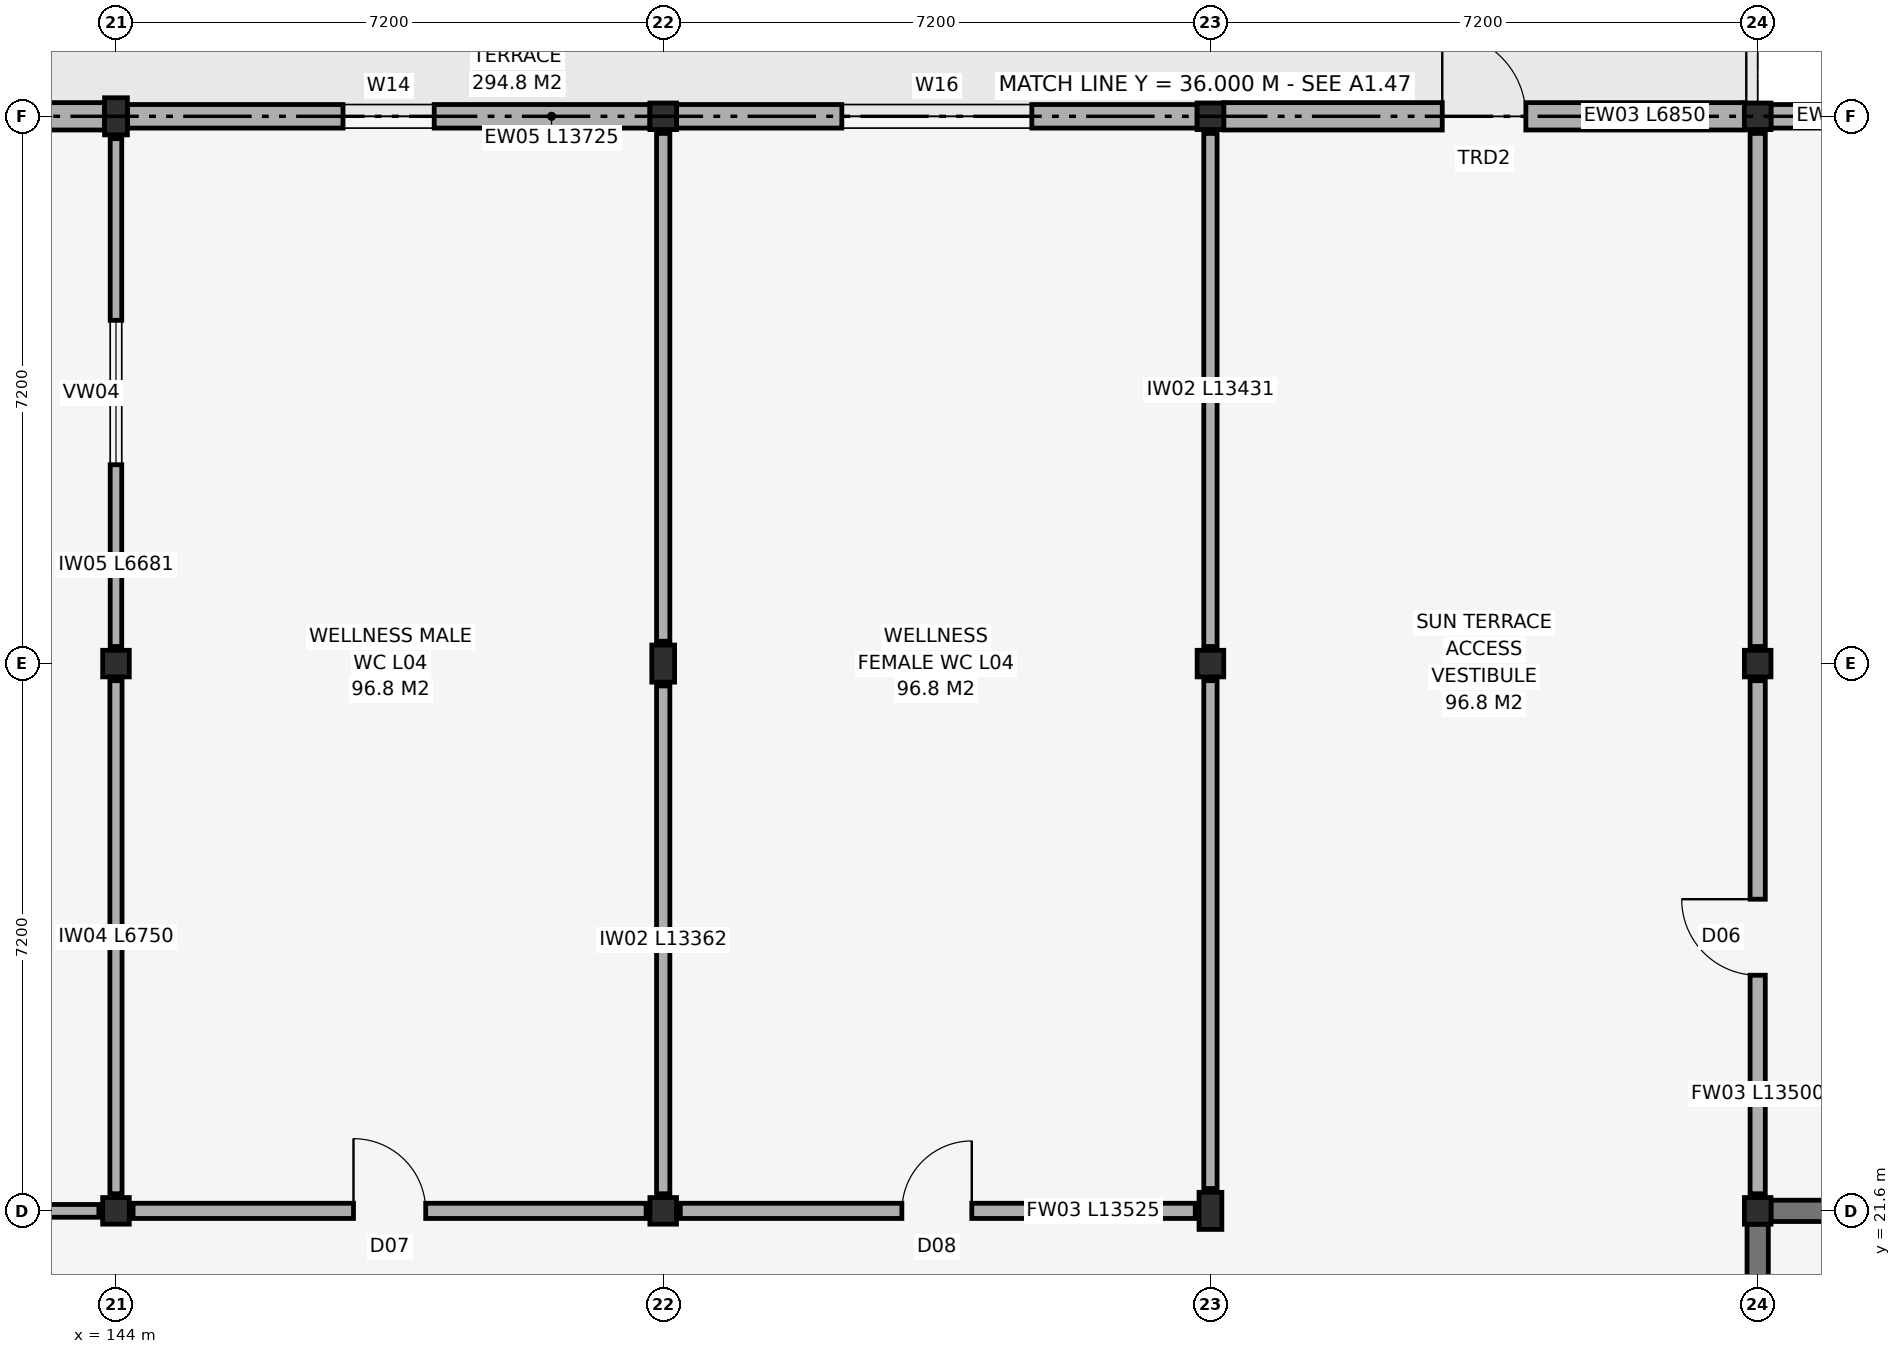
"""IFC4 building model, lengths in metres.
Left out: names, types, materials, properties, quantities, classifications, styles, units other than length and angle.
Written with IfcOpenShell. Run it as: python <this file> out.ifc"""

import sys

from ifc_helpers import new_model, si_unit, direction, frame, frame_2d, origin, origin_2d, place, context, subcontext, project, spatial, rectangle, i_section, extrude, element, fill, save


model = new_model("IFC4")
c1 = context("Model", 3, precision=1e-05, world=origin(), true_north=direction((0.0, 1.0)))
c2 = subcontext(c1, "Body", "Model", "MODEL_VIEW")
j1 = project(units=[si_unit("LENGTHUNIT", "METRE"), si_unit("PLANEANGLEUNIT", "RADIAN")], contexts=[c1])
p1 = place(None, origin())
s1 = spatial("IfcSite", under=j1, at=p1, CompositionType="ELEMENT")
p2 = place(p1, origin())
s2 = spatial("IfcBuilding", under=s1, at=p2, CompositionType="ELEMENT")
p3 = place(p2, frame((0.0, 0.0, 19.2)))
s3 = spatial("IfcBuildingStorey", under=s2, at=p3, CompositionType="ELEMENT", Elevation=19.2)
for number, where, z_axis, x_axis in (
    (1, (144.0, 21.6, 0.0), (0.0, 0.0, 1.0), (1.0, 0.0, 0.0)),
    (2, (144.0, 28.8, 0.0), (0.0, 0.0, 1.0), (1.0, 0.0, 0.0)),
):
    element("IfcColumn", number, at=place(p3, frame(where, z_axis=z_axis, x_axis=x_axis)), inside=s3, PredefinedType="COLUMN", context=c2, shape_type="SweptSolid", body=[
        extrude(i_section(OverallWidth=0.35, OverallDepth=0.35, WebThickness=0.012, FlangeThickness=0.019, FilletRadius=0.02, at=origin_2d()), origin(), (0.0, 0.0, 1.0), 4.2),
    ])
p4 = place(p3, frame((144.0, 36.0, 0.0), z_axis=(0.0, 0.0, 1.0), x_axis=(1.0, 0.0, 0.0)))
e3 = element("IfcColumn", 3, at=p4, inside=s3, PredefinedType="COLUMN", context=c2, shape_type="SweptSolid", body=[
    extrude(i_section(OverallWidth=0.3, OverallDepth=0.488, WebThickness=0.011, FlangeThickness=0.018, FilletRadius=0.026, at=origin_2d()), origin(), (0.0, 0.0, 1.0), 4.2),
])
p5 = place(p3, frame((151.2, 21.6, 0.0), z_axis=(0.0, 0.0, 1.0), x_axis=(1.0, 0.0, 0.0)))
e4 = element("IfcColumn", 4, at=p5, inside=s3, PredefinedType="COLUMN", context=c2, shape_type="SweptSolid", body=[
    extrude(i_section(OverallWidth=0.35, OverallDepth=0.35, WebThickness=0.012, FlangeThickness=0.019, FilletRadius=0.02, at=origin_2d()), origin(), (0.0, 0.0, 1.0), 4.2),
])
p6 = place(p3, frame((151.2, 28.8, 0.0), z_axis=(0.0, 0.0, 1.0), x_axis=(1.0, 0.0, 0.0)))
e5 = element("IfcColumn", 5, at=p6, inside=s3, PredefinedType="COLUMN", context=c2, shape_type="SweptSolid", body=[
    extrude(i_section(OverallWidth=0.3, OverallDepth=0.488, WebThickness=0.011, FlangeThickness=0.018, FilletRadius=0.026, at=origin_2d()), origin(), (0.0, 0.0, 1.0), 4.2),
])
p7 = place(p3, frame((151.2, 36.0, 0.0), z_axis=(0.0, 0.0, 1.0), x_axis=(1.0, 0.0, 0.0)))
e6 = element("IfcColumn", 6, at=p7, inside=s3, PredefinedType="COLUMN", context=c2, shape_type="SweptSolid", body=[
    extrude(i_section(OverallWidth=0.35, OverallDepth=0.35, WebThickness=0.012, FlangeThickness=0.019, FilletRadius=0.02, at=origin_2d()), origin(), (0.0, 0.0, 1.0), 4.2),
])
p8 = place(p3, frame((158.4, 21.6, 0.0), z_axis=(0.0, 0.0, 1.0), x_axis=(1.0, 0.0, 0.0)))
e7 = element("IfcColumn", 7, at=p8, inside=s3, PredefinedType="COLUMN", context=c2, shape_type="SweptSolid", body=[
    extrude(i_section(OverallWidth=0.3, OverallDepth=0.488, WebThickness=0.011, FlangeThickness=0.018, FilletRadius=0.026, at=origin_2d()), origin(), (0.0, 0.0, 1.0), 4.2),
])
for number, where, z_axis, x_axis in (
    (8, (158.4, 28.8, 0.0), (0.0, 0.0, 1.0), (1.0, 0.0, 0.0)),
    (9, (158.4, 36.0, 0.0), (0.0, 0.0, 1.0), (1.0, 0.0, 0.0)),
    (10, (165.6, 21.6, 0.0), (0.0, 0.0, 1.0), (1.0, 0.0, 0.0)),
    (11, (165.6, 28.8, 0.0), (0.0, 0.0, 1.0), (1.0, 0.0, 0.0)),
    (12, (165.6, 36.0, 0.0), (0.0, 0.0, 1.0), (1.0, 0.0, 0.0)),
):
    element("IfcColumn", number, at=place(p3, frame(where, z_axis=z_axis, x_axis=x_axis)), inside=s3, PredefinedType="COLUMN", context=c2, shape_type="SweptSolid", body=[
        extrude(i_section(OverallWidth=0.35, OverallDepth=0.35, WebThickness=0.012, FlangeThickness=0.019, FilletRadius=0.02, at=origin_2d()), origin(), (0.0, 0.0, 1.0), 4.2),
    ])
p9 = place(p3, frame((136.975, 36.0, 0.0), z_axis=(0.0, 0.0, 1.0), x_axis=(1.0, 0.0, 0.0)))
e13 = element("IfcWall", 13, at=p9, inside=s3, PredefinedType="SOLIDWALL", context=c2, shape_type="SweptSolid", body=[
    extrude(rectangle(XDim=6.875, YDim=0.36, at=frame_2d((3.438, 0.0))), origin(), (0.0, 0.0, 1.0), 3.64),
])
p10 = place(p9, frame((2.388, 0.0, 0.95)))
e14 = element("IfcOpeningElement", 14, at=p10, cuts=e13, PredefinedType="OPENING", context=c2, shape_type="SweptSolid", body=[
    extrude(rectangle(XDim=2.1, YDim=1.75, at=frame_2d((1.05, 0.875))), frame((0.0, 0.195, 0.0), z_axis=(0.0, -1.0, 0.0), x_axis=(1.0, 0.0, 0.0)), (0.0, 0.0, 1.0), 0.39),
])
p11 = place(p3, frame((144.15, 36.0, 0.0), z_axis=(0.0, 0.0, 1.0), x_axis=(1.0, 0.0, 0.0)))
e15 = element("IfcWall", 15, at=p11, inside=s3, PredefinedType="SOLIDWALL", context=c2, shape_type="SweptSolid", body=[
    extrude(rectangle(XDim=6.875, YDim=0.31, at=frame_2d((3.438, 0.0))), origin(), (0.0, 0.0, 1.0), 3.64),
])
p12 = place(p11, frame((2.837, 0.0, 0.95)))
e16 = element("IfcOpeningElement", 16, at=p12, cuts=e15, PredefinedType="OPENING", context=c2, shape_type="SweptSolid", body=[
    extrude(rectangle(XDim=1.2, YDim=1.75, at=frame_2d((0.6, 0.875))), frame((0.0, 0.17, 0.0), z_axis=(0.0, -1.0, 0.0), x_axis=(1.0, 0.0, 0.0)), (0.0, 0.0, 1.0), 0.34),
])
p13 = place(p3, frame((151.375, 36.0, 0.0), z_axis=(0.0, 0.0, 1.0), x_axis=(1.0, 0.0, 0.0)))
e17 = element("IfcWall", 17, at=p13, inside=s3, PredefinedType="SOLIDWALL", context=c2, shape_type="SweptSolid", body=[
    extrude(rectangle(XDim=6.85, YDim=0.31, at=frame_2d((3.425, 0.0))), origin(), (0.0, 0.0, 1.0), 3.64),
])
p14 = place(p13, frame((2.175, 0.0, 0.95)))
e18 = element("IfcOpeningElement", 18, at=p14, cuts=e17, PredefinedType="OPENING", context=c2, shape_type="SweptSolid", body=[
    extrude(rectangle(XDim=2.5, YDim=1.35, at=frame_2d((1.25, 0.675))), frame((0.0, 0.17, 0.0), z_axis=(0.0, -1.0, 0.0), x_axis=(1.0, 0.0, 0.0)), (0.0, 0.0, 1.0), 0.34),
])
p15 = place(p3, frame((158.575, 36.0, 0.0), z_axis=(0.0, 0.0, 1.0), x_axis=(1.0, 0.0, 0.0)))
e19 = element("IfcWall", 19, at=p15, inside=s3, PredefinedType="SOLIDWALL", context=c2, shape_type="SweptSolid", body=[
    extrude(rectangle(XDim=6.85, YDim=0.36, at=frame_2d((3.425, 0.0))), origin(), (0.0, 0.0, 1.0), 3.64),
])
p16 = place(p15, frame((2.875, 0.0, 0.0)))
e20 = element("IfcOpeningElement", 20, at=p16, cuts=e19, PredefinedType="OPENING", context=c2, shape_type="SweptSolid", body=[
    extrude(rectangle(XDim=1.1, YDim=2.2, at=frame_2d((0.55, 1.1))), frame((0.0, 0.195, 0.0), z_axis=(0.0, -1.0, 0.0), x_axis=(1.0, 0.0, 0.0)), (0.0, 0.0, 1.0), 0.39),
])
p17 = place(p3, frame((165.775, 36.0, 0.0), z_axis=(0.0, 0.0, 1.0), x_axis=(1.0, 0.0, 0.0)))
e21 = element("IfcWall", 21, at=p17, inside=s3, PredefinedType="SOLIDWALL", context=c2, shape_type="SweptSolid", body=[
    extrude(rectangle(XDim=6.85, YDim=0.31, at=frame_2d((3.425, 0.0))), origin(), (0.0, 0.0, 1.0), 3.64),
])
p18 = place(p17, frame((2.525, 0.0, 0.95)))
e22 = element("IfcOpeningElement", 22, at=p18, cuts=e21, PredefinedType="OPENING", context=c2, shape_type="SweptSolid", body=[
    extrude(rectangle(XDim=1.8, YDim=2.0, at=frame_2d((0.9, 1.0))), frame((0.0, 0.17, 0.0), z_axis=(0.0, -1.0, 0.0), x_axis=(1.0, 0.0, 0.0)), (0.0, 0.0, 1.0), 0.34),
])
p19 = place(p3, frame((165.775, 21.6, 0.0), z_axis=(0.0, 0.0, 1.0), x_axis=(1.0, 0.0, 0.0)))
e23 = element("IfcWall", 23, at=p19, inside=s3, PredefinedType="SHEAR", context=c2, shape_type="SweptSolid", body=[
    extrude(rectangle(XDim=6.85, YDim=0.28, at=frame_2d((3.425, 0.0))), origin(), (0.0, 0.0, 1.0), 3.98),
])
p20 = place(p3, frame((165.6, 14.644, 0.0), z_axis=(0.0, 0.0, 1.0), x_axis=(0.0, 1.0, 0.0)))
e24 = element("IfcWall", 24, at=p20, inside=s3, PredefinedType="SHEAR", context=c2, shape_type="SweptSolid", body=[
    extrude(rectangle(XDim=6.781, YDim=0.28, at=frame_2d((3.391, 0.0))), origin(), (0.0, 0.0, 1.0), 3.98),
])
p21 = place(p20, frame((2.591, 0.0, 0.0)))
e25 = element("IfcOpeningElement", 25, at=p21, cuts=e24, PredefinedType="OPENING", context=c2, shape_type="SweptSolid", body=[
    extrude(rectangle(XDim=1.6, YDim=2.2, at=frame_2d((0.8, 1.1))), frame((0.0, 0.155, 0.0), z_axis=(0.0, -1.0, 0.0), x_axis=(1.0, 0.0, 0.0)), (0.0, 0.0, 1.0), 0.31),
])
p22 = place(p3, frame((137.025, 21.6, 0.0), z_axis=(0.0, 0.0, 1.0), x_axis=(1.0, 0.0, 0.0)))
e26 = element("IfcWall", 26, at=p22, inside=s3, PredefinedType="PARTITIONING", context=c2, shape_type="SweptSolid", body=[
    extrude(rectangle(XDim=6.75, YDim=0.168, at=frame_2d((3.375, 0.0))), origin(), (0.0, 0.0, 1.0), 3.64),
])
p23 = place(p22, frame((2.845, 0.0, 0.0)))
e27 = element("IfcOpeningElement", 27, at=p23, cuts=e26, PredefinedType="OPENING", context=c2, shape_type="SweptSolid", body=[
    extrude(rectangle(XDim=1.06, YDim=2.15, at=frame_2d((0.53, 1.075))), frame((0.0, 0.099, 0.0), z_axis=(0.0, -1.0, 0.0), x_axis=(1.0, 0.0, 0.0)), (0.0, 0.0, 1.0), 0.198),
])
p24 = place(p3, frame((144.0, 21.825, 0.0), z_axis=(0.0, 0.0, 1.0), x_axis=(0.0, 1.0, 0.0)))
e28 = element("IfcWall", 28, at=p24, inside=s3, PredefinedType="PARTITIONING", context=c2, shape_type="SweptSolid", body=[
    extrude(rectangle(XDim=6.75, YDim=0.16, at=frame_2d((3.375, 0.0))), origin(), (0.0, 0.0, 1.0), 3.64),
])
p25 = place(p3, frame((144.0, 29.025, 0.0), z_axis=(0.0, 0.0, 1.0), x_axis=(0.0, 1.0, 0.0)))
e29 = element("IfcWall", 29, at=p25, inside=s3, PredefinedType="PARTITIONING", context=c2, shape_type="SweptSolid", body=[
    extrude(rectangle(XDim=6.681, YDim=0.152, at=frame_2d((3.341, 0.0))), origin(), (0.0, 0.0, 1.0), 3.64),
])
p26 = place(p25, frame((2.391, 0.0, 0.95)))
e30 = element("IfcOpeningElement", 30, at=p26, cuts=e29, PredefinedType="OPENING", context=c2, shape_type="SweptSolid", body=[
    extrude(rectangle(XDim=1.9, YDim=1.5, at=frame_2d((0.95, 0.75))), frame((0.0, 0.091, 0.0), z_axis=(0.0, -1.0, 0.0), x_axis=(1.0, 0.0, 0.0)), (0.0, 0.0, 1.0), 0.182),
])
p27 = place(p3, frame((144.225, 21.6, 0.0), z_axis=(0.0, 0.0, 1.0), x_axis=(1.0, 0.0, 0.0)))
e31 = element("IfcWall", 31, at=p27, inside=s3, PredefinedType="SOLIDWALL", context=c2, shape_type="SweptSolid", body=[
    extrude(rectangle(XDim=6.75, YDim=0.2, at=frame_2d((3.375, 0.0))), origin(), (0.0, 0.0, 1.0), 3.64),
])
p28 = place(p27, frame((2.9, 0.0, 0.0)))
e32 = element("IfcOpeningElement", 32, at=p28, cuts=e31, PredefinedType="OPENING", context=c2, shape_type="SweptSolid", body=[
    extrude(rectangle(XDim=0.95, YDim=2.1, at=frame_2d((0.475, 1.05))), frame((0.0, 0.115, 0.0), z_axis=(0.0, -1.0, 0.0), x_axis=(1.0, 0.0, 0.0)), (0.0, 0.0, 1.0), 0.23),
])
p29 = place(p3, frame((151.2, 21.825, 0.0), z_axis=(0.0, 0.0, 1.0), x_axis=(0.0, 1.0, 0.0)))
e33 = element("IfcWall", 33, at=p29, inside=s3, PredefinedType="PARTITIONING", context=c2, shape_type="SweptSolid", body=[
    extrude(rectangle(XDim=6.681, YDim=0.175, at=frame_2d((3.341, 0.0))), origin(), (0.0, 0.0, 1.0), 3.64),
])
p30 = place(p3, frame((151.2, 29.094, 0.0), z_axis=(0.0, 0.0, 1.0), x_axis=(0.0, 1.0, 0.0)))
e34 = element("IfcWall", 34, at=p30, inside=s3, PredefinedType="PARTITIONING", context=c2, shape_type="SweptSolid", body=[
    extrude(rectangle(XDim=6.681, YDim=0.175, at=frame_2d((3.34, 0.0))), origin(), (0.0, 0.0, 1.0), 3.64),
])
p31 = place(p3, frame((151.425, 21.6, 0.0), z_axis=(0.0, 0.0, 1.0), x_axis=(1.0, 0.0, 0.0)))
e35 = element("IfcWall", 35, at=p31, inside=s3, PredefinedType="SOLIDWALL", context=c2, shape_type="SweptSolid", body=[
    extrude(rectangle(XDim=6.775, YDim=0.2, at=frame_2d((3.387, 0.0))), origin(), (0.0, 0.0, 1.0), 3.64),
])
p32 = place(p31, frame((2.915, 0.0, 0.0)))
e36 = element("IfcOpeningElement", 36, at=p32, cuts=e35, PredefinedType="OPENING", context=c2, shape_type="SweptSolid", body=[
    extrude(rectangle(XDim=0.92, YDim=2.1, at=frame_2d((0.46, 1.05))), frame((0.0, 0.115, 0.0), z_axis=(0.0, -1.0, 0.0), x_axis=(1.0, 0.0, 0.0)), (0.0, 0.0, 1.0), 0.23),
])
p33 = place(p3, frame((158.4, 21.894, 0.0), z_axis=(0.0, 0.0, 1.0), x_axis=(0.0, 1.0, 0.0)))
e37 = element("IfcWall", 37, at=p33, inside=s3, PredefinedType="PARTITIONING", context=c2, shape_type="SweptSolid", body=[
    extrude(rectangle(XDim=6.681, YDim=0.175, at=frame_2d((3.34, 0.0))), origin(), (0.0, 0.0, 1.0), 3.64),
])
p34 = place(p3, frame((158.4, 29.025, 0.0), z_axis=(0.0, 0.0, 1.0), x_axis=(0.0, 1.0, 0.0)))
e38 = element("IfcWall", 38, at=p34, inside=s3, PredefinedType="PARTITIONING", context=c2, shape_type="SweptSolid", body=[
    extrude(rectangle(XDim=6.75, YDim=0.175, at=frame_2d((3.375, 0.0))), origin(), (0.0, 0.0, 1.0), 3.64),
])
p35 = place(p3, frame((165.6, 21.825, 0.0), z_axis=(0.0, 0.0, 1.0), x_axis=(0.0, 1.0, 0.0)))
e39 = element("IfcWall", 39, at=p35, inside=s3, PredefinedType="SOLIDWALL", context=c2, shape_type="SweptSolid", body=[
    extrude(rectangle(XDim=6.75, YDim=0.2, at=frame_2d((3.375, 0.0))), origin(), (0.0, 0.0, 1.0), 3.64),
])
p36 = place(p35, frame((2.875, 0.0, 0.0)))
e40 = element("IfcOpeningElement", 40, at=p36, cuts=e39, PredefinedType="OPENING", context=c2, shape_type="SweptSolid", body=[
    extrude(rectangle(XDim=1.0, YDim=2.1, at=frame_2d((0.5, 1.05))), frame((0.0, 0.115, 0.0), z_axis=(0.0, -1.0, 0.0), x_axis=(1.0, 0.0, 0.0)), (0.0, 0.0, 1.0), 0.23),
])
p37 = place(p3, frame((165.6, 29.025, 0.0), z_axis=(0.0, 0.0, 1.0), x_axis=(0.0, 1.0, 0.0)))
e41 = element("IfcWall", 41, at=p37, inside=s3, PredefinedType="SOLIDWALL", context=c2, shape_type="SweptSolid", body=[
    extrude(rectangle(XDim=6.75, YDim=0.2, at=frame_2d((3.375, 0.0))), origin(), (0.0, 0.0, 1.0), 3.64),
])
p38 = place(p12, origin())
e42 = element("IfcWindow", 42, at=p38, inside=s3, PartitioningType="SINGLE_PANEL", PredefinedType="WINDOW", context=c2, shape_type="SweptSolid", body=[
    extrude(rectangle(XDim=1.2, YDim=1.75, at=frame_2d((0.6, 0.875))), frame((0.0, 0.03, 0.0), z_axis=(0.0, -1.0, 0.0), x_axis=(1.0, 0.0, 0.0)), (0.0, 0.0, 1.0), 0.06),
])
fill(e16, e42)
p39 = place(p14, origin())
e43 = element("IfcWindow", 43, at=p39, inside=s3, PartitioningType="SINGLE_PANEL", PredefinedType="WINDOW", context=c2, shape_type="SweptSolid", body=[
    extrude(rectangle(XDim=2.5, YDim=1.35, at=frame_2d((1.25, 0.675))), frame((0.0, 0.03, 0.0), z_axis=(0.0, -1.0, 0.0), x_axis=(1.0, 0.0, 0.0)), (0.0, 0.0, 1.0), 0.06),
])
fill(e18, e43)
p40 = place(p16, origin())
e44 = element("IfcDoor", 44, at=p40, inside=s3, OperationType="SINGLE_SWING_LEFT", PredefinedType="DOOR", context=c2, shape_type="SweptSolid", body=[
    extrude(rectangle(XDim=1.1, YDim=2.2, at=frame_2d((0.55, 1.1))), frame((0.0, 0.025, 0.0), z_axis=(0.0, -1.0, 0.0), x_axis=(1.0, 0.0, 0.0)), (0.0, 0.0, 1.0), 0.05),
])
fill(e20, e44)
p41 = place(p26, origin())
e45 = element("IfcWindow", 45, at=p41, inside=s3, PartitioningType="SINGLE_PANEL", PredefinedType="WINDOW", context=c2, shape_type="SweptSolid", body=[
    extrude(rectangle(XDim=1.9, YDim=1.5, at=frame_2d((0.95, 0.75))), frame((0.0, 0.03, 0.0), z_axis=(0.0, -1.0, 0.0), x_axis=(1.0, 0.0, 0.0)), (0.0, 0.0, 1.0), 0.06),
])
fill(e30, e45)
p42 = place(p28, origin())
e46 = element("IfcDoor", 46, at=p42, inside=s3, OperationType="SINGLE_SWING_LEFT", PredefinedType="DOOR", context=c2, shape_type="SweptSolid", body=[
    extrude(rectangle(XDim=0.95, YDim=2.1, at=frame_2d((0.475, 1.05))), frame((0.0, 0.025, 0.0), z_axis=(0.0, -1.0, 0.0), x_axis=(1.0, 0.0, 0.0)), (0.0, 0.0, 1.0), 0.05),
])
fill(e32, e46)
p43 = place(p32, origin())
e47 = element("IfcDoor", 47, at=p43, inside=s3, OperationType="SINGLE_SWING_RIGHT", PredefinedType="DOOR", context=c2, shape_type="SweptSolid", body=[
    extrude(rectangle(XDim=0.92, YDim=2.1, at=frame_2d((0.46, 1.05))), frame((0.0, 0.025, 0.0), z_axis=(0.0, -1.0, 0.0), x_axis=(1.0, 0.0, 0.0)), (0.0, 0.0, 1.0), 0.05),
])
fill(e36, e47)
p44 = place(p36, frame((1.0, 0.0, 0.0), z_axis=(0.0, 0.0, 1.0), x_axis=(-1.0, 0.0, 0.0)))
e48 = element("IfcDoor", 48, at=p44, inside=s3, OperationType="SINGLE_SWING_LEFT", PredefinedType="DOOR", context=c2, shape_type="SweptSolid", body=[
    extrude(rectangle(XDim=1.0, YDim=2.1, at=frame_2d((0.5, 1.05))), frame((0.0, 0.025, 0.0), z_axis=(0.0, -1.0, 0.0), x_axis=(1.0, 0.0, 0.0)), (0.0, 0.0, 1.0), 0.05),
])
fill(e40, e48)
save(model, sys.argv[1])
